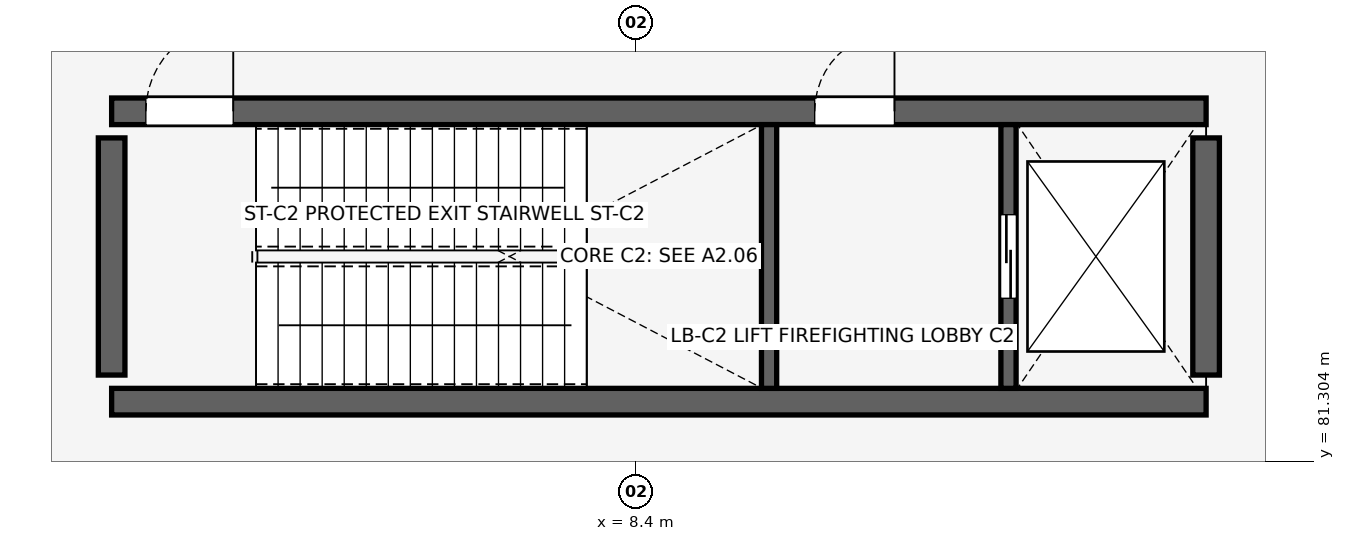
"""IFC4 building model, lengths in metres.
Left out: names, types, materials, properties, quantities, classifications, styles, units other than length and angle.
Written with IfcOpenShell. Run it as: python <this file> out.ifc"""

import sys

from ifc_helpers import new_model, si_unit, direction, frame, frame_2d, origin, place, context, subcontext, project, spatial, rectangle, extrude, element, fill, save


model = new_model("IFC4")
c1 = context("Model", 3, precision=1e-05, world=origin(), true_north=direction((0.0, 1.0)))
c2 = subcontext(c1, "Body", "Model", "MODEL_VIEW")
j1 = project(units=[si_unit("LENGTHUNIT", "METRE"), si_unit("PLANEANGLEUNIT", "RADIAN")], contexts=[c1])
p1 = place(None, origin())
s1 = spatial("IfcSite", under=j1, at=p1, CompositionType="ELEMENT")
p2 = place(p1, origin())
s2 = spatial("IfcBuilding", under=s1, at=p2, CompositionType="ELEMENT")
p3 = place(p2, origin())
s3 = spatial("IfcBuildingStorey", under=s2, at=p3, CompositionType="ELEMENT", Elevation=0.0)
p4 = place(p3, frame((1.5, 82.09, 0.0), z_axis=(0.0, 0.0, 1.0), x_axis=(1.0, 0.0, 0.0)))
e1 = element("IfcWall", 1, at=p4, inside=s3, PredefinedType="SHEAR", context=c2, shape_type="SweptSolid", body=[
    extrude(rectangle(XDim=14.4, YDim=0.35, at=frame_2d((7.2, 0.0))), origin(), (0.0, 0.0, 1.0), 5.15),
])
p5 = place(p3, frame((1.5, 85.91, 0.0), z_axis=(0.0, 0.0, 1.0), x_axis=(1.0, 0.0, 0.0)))
e2 = element("IfcWall", 2, at=p5, inside=s3, PredefinedType="SHEAR", context=c2, shape_type="SweptSolid", body=[
    extrude(rectangle(XDim=14.4, YDim=0.35, at=frame_2d((7.2, 0.0))), origin(), (0.0, 0.0, 1.0), 5.15),
])
p6 = place(p5, frame((0.45, 0.0, 0.0), z_axis=(0.0, 0.0, 1.0), x_axis=(1.0, 0.0, 0.0)))
e3 = element("IfcOpeningElement", 3, at=p6, cuts=e2, PredefinedType="OPENING", context=c2, shape_type="SweptSolid", body=[
    extrude(rectangle(XDim=1.15, YDim=2.15, at=frame_2d((0.575, 1.075))), frame((0.0, 0.185, 0.0), z_axis=(0.0, -1.0, 0.0), x_axis=(1.0, 0.0, 0.0)), (0.0, 0.0, 1.0), 0.37),
])
p7 = place(p5, frame((9.25, 0.0, 0.0), z_axis=(0.0, 0.0, 1.0), x_axis=(1.0, 0.0, 0.0)))
e4 = element("IfcOpeningElement", 4, at=p7, cuts=e2, PredefinedType="OPENING", context=c2, shape_type="SweptSolid", body=[
    extrude(rectangle(XDim=1.05, YDim=2.15, at=frame_2d((0.525, 1.075))), frame((0.0, 0.185, 0.0), z_axis=(0.0, -1.0, 0.0), x_axis=(1.0, 0.0, 0.0)), (0.0, 0.0, 1.0), 0.37),
])
for number, where, z_axis, x_axis in (
    (5, (1.5, 82.44, 0.0), (0.0, 0.0, 1.0), (0.0, 1.0, 0.0)),
    (6, (15.9, 82.44, 0.0), (0.0, 0.0, 1.0), (0.0, 1.0, 0.0)),
):
    element("IfcWall", number, at=place(p3, frame(where, z_axis=z_axis, x_axis=x_axis)), inside=s3, PredefinedType="SHEAR", context=c2, shape_type="SweptSolid", body=[
        extrude(rectangle(XDim=3.12, YDim=0.35, at=frame_2d((1.56, 0.0))), origin(), (0.0, 0.0, 1.0), 5.15),
    ])
p8 = place(p3, frame((10.15, 82.265, 0.0), z_axis=(0.0, 0.0, 1.0), x_axis=(0.0, 1.0, 0.0)))
e7 = element("IfcWall", 7, at=p8, inside=s3, PredefinedType="SHEAR", context=c2, shape_type="SweptSolid", body=[
    extrude(rectangle(XDim=3.47, YDim=0.2, at=frame_2d((1.735, 0.0))), origin(), (0.0, 0.0, 1.0), 5.15),
])
p9 = place(p3, frame((13.3, 82.265, 0.0), z_axis=(0.0, 0.0, 1.0), x_axis=(0.0, 1.0, 0.0)))
e8 = element("IfcWall", 8, at=p9, inside=s3, PredefinedType="SHEAR", context=c2, shape_type="SweptSolid", body=[
    extrude(rectangle(XDim=3.47, YDim=0.2, at=frame_2d((1.735, 0.0))), origin(), (0.0, 0.0, 1.0), 5.15),
])
p10 = place(p9, frame((1.185, 0.0, 0.0), z_axis=(0.0, 0.0, 1.0), x_axis=(1.0, 0.0, 0.0)))
e9 = element("IfcOpeningElement", 9, at=p10, cuts=e8, PredefinedType="OPENING", context=c2, shape_type="SweptSolid", body=[
    extrude(rectangle(XDim=1.1, YDim=2.15, at=frame_2d((0.55, 1.075))), frame((0.0, 0.11, 0.0), z_axis=(0.0, -1.0, 0.0), x_axis=(1.0, 0.0, 0.0)), (0.0, 0.0, 1.0), 0.22),
])
p11 = place(p6, origin())
e10 = element("IfcDoor", 10, at=p11, inside=s3, OperationType="SINGLE_SWING_RIGHT", PredefinedType="DOOR", context=c2, shape_type="SweptSolid", body=[
    extrude(rectangle(XDim=1.15, YDim=2.15, at=frame_2d((0.575, 1.075))), frame((0.0, 0.025, 0.0), z_axis=(0.0, -1.0, 0.0), x_axis=(1.0, 0.0, 0.0)), (0.0, 0.0, 1.0), 0.05),
])
fill(e3, e10)
p12 = place(p7, origin())
e11 = element("IfcDoor", 11, at=p12, inside=s3, OperationType="SINGLE_SWING_RIGHT", PredefinedType="DOOR", context=c2, shape_type="SweptSolid", body=[
    extrude(rectangle(XDim=1.05, YDim=2.15, at=frame_2d((0.525, 1.075))), frame((0.0, 0.025, 0.0), z_axis=(0.0, -1.0, 0.0), x_axis=(1.0, 0.0, 0.0)), (0.0, 0.0, 1.0), 0.05),
])
fill(e4, e11)
p13 = place(p10, origin())
e12 = element("IfcDoor", 12, at=p13, inside=s3, OperationType="DOUBLE_DOOR_SLIDING", PredefinedType="DOOR", context=c2, shape_type="SweptSolid", body=[
    extrude(rectangle(XDim=1.1, YDim=2.15, at=frame_2d((0.55, 1.075))), frame((0.0, 0.025, 0.0), z_axis=(0.0, -1.0, 0.0), x_axis=(1.0, 0.0, 0.0)), (0.0, 0.0, 1.0), 0.05),
])
fill(e9, e12)
save(model, sys.argv[1])
